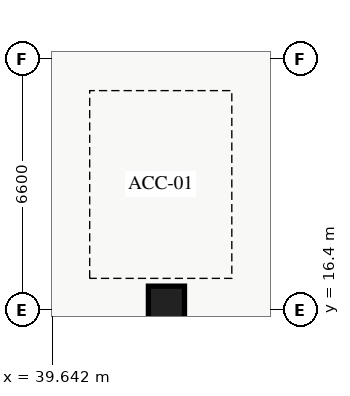
"""IFC4 building model, lengths in metres.
Left out: names, types, materials, properties, quantities, classifications, styles, units other than length and angle.
Written with IfcOpenShell. Run it as: python <this file> out.ifc"""

import sys

from ifc_helpers import new_model, si_unit, direction, frame, origin, origin_2d, place, context, subcontext, project, spatial, rectangle, extrude, source, transform, mapped, element, save


model = new_model("IFC4")
c1 = context("Model", 3, precision=1e-05, world=origin(), true_north=direction((0.0, 1.0)))
c2 = subcontext(c1, "Body", "Model", "MODEL_VIEW")
j1 = project(units=[si_unit("LENGTHUNIT", "METRE"), si_unit("PLANEANGLEUNIT", "RADIAN")], contexts=[c1])
p1 = place(None, origin())
s1 = spatial("IfcSite", under=j1, at=p1, CompositionType="ELEMENT")
p2 = place(p1, origin())
s2 = spatial("IfcBuilding", under=s1, at=p2, CompositionType="ELEMENT")
p3 = place(p2, frame((0.0, 0.0, -4.8)))
s3 = spatial("IfcBuildingStorey", under=s2, at=p3, CompositionType="ELEMENT", Elevation=-4.8)
m1 = source(origin(), c2, "Body", "SweptSolid", [
    extrude(rectangle(XDim=0.95, YDim=0.95, at=origin_2d()), origin(), (0.0, 0.0, 1.0), 4.8),
])
p4 = place(p3, frame((42.65, 16.55, 0.0), z_axis=(0.0, 0.0, 1.0), x_axis=(1.0, 0.0, 0.0)))
e1 = element("IfcColumn", 1, at=p4, inside=s3, PredefinedType="COLUMN", context=c2, shape_type="MappedRepresentation", body=[
    mapped(m1, transform((0.0, 0.0, 0.0), x_axis=(1.0, 0.0, 0.0), y_axis=(0.0, 1.0, 0.0), z_axis=(0.0, 0.0, 1.0), scale=1.0)),
])
save(model, sys.argv[1])
